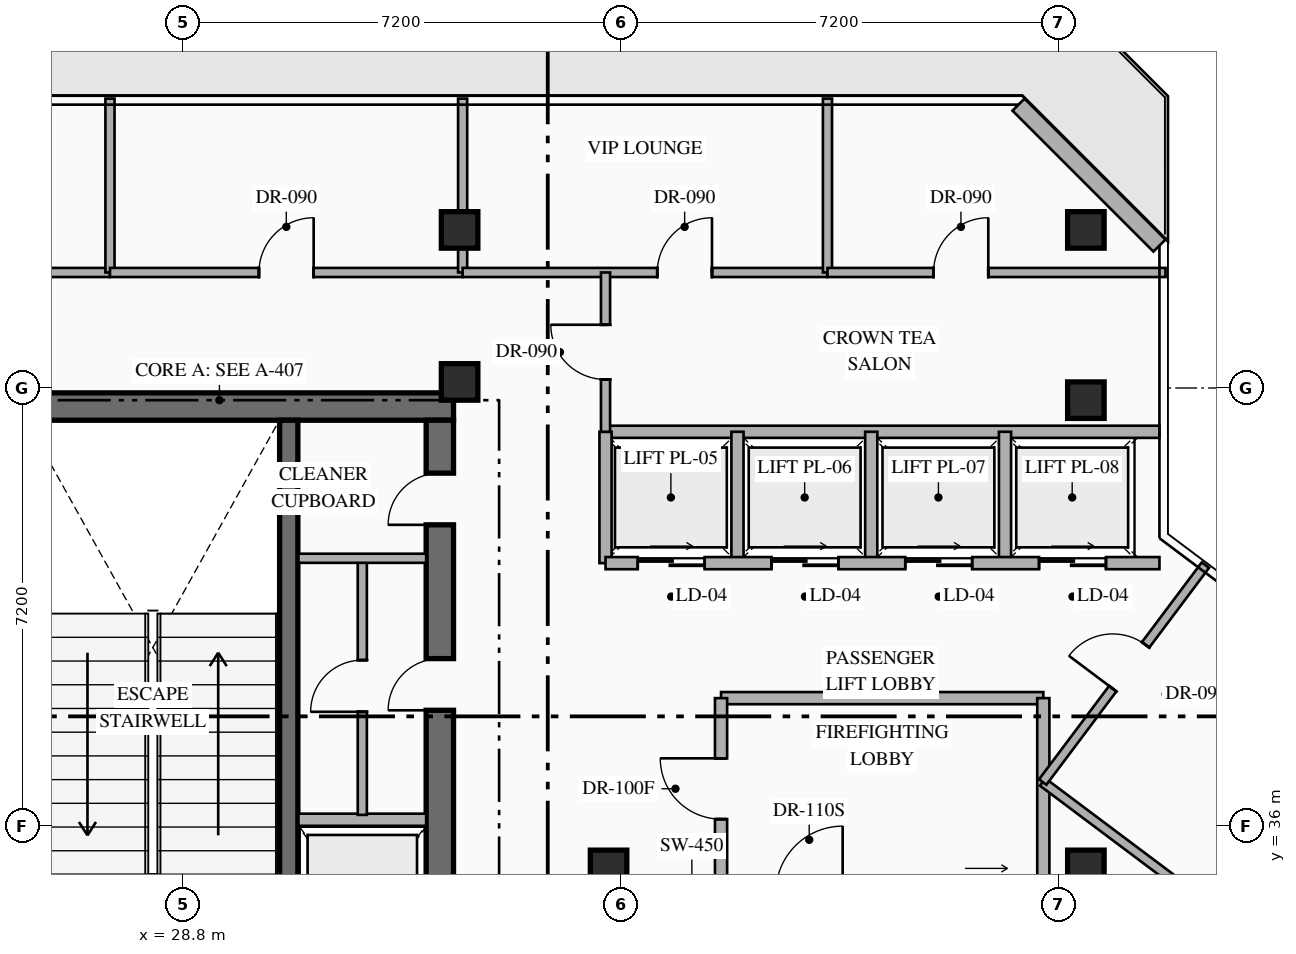
"""IFC4 building model, lengths in metres.
Left out: names, types, materials, properties, quantities, classifications, styles, units other than length and angle.
Written with IfcOpenShell. Run it as: python <this file> out.ifc"""

import sys

from ifc_helpers import new_model, si_unit, direction, frame, frame_2d, origin, origin_2d, place, context, subcontext, project, spatial, rectangle, hollow_rectangle, extrude, element, fill, save


model = new_model("IFC4")
c1 = context("Model", 3, precision=1e-05, world=origin(), true_north=direction((0.0, 1.0)))
c2 = subcontext(c1, "Body", "Model", "MODEL_VIEW")
j1 = project(units=[si_unit("LENGTHUNIT", "METRE"), si_unit("PLANEANGLEUNIT", "RADIAN")], contexts=[c1])
p1 = place(None, origin())
s1 = spatial("IfcSite", under=j1, at=p1, CompositionType="ELEMENT")
p2 = place(p1, origin())
s2 = spatial("IfcBuilding", under=s1, at=p2, CompositionType="ELEMENT")
p3 = place(p2, frame((0.0, 0.0, 265.95)))
s3 = spatial("IfcBuildingStorey", under=s2, at=p3, CompositionType="ELEMENT", Elevation=265.95)
p4 = place(p3, frame((25.77, 42.895, 0.0), z_axis=(0.0, 0.0, 1.0), x_axis=(1.0, 0.0, 0.0)))
e1 = element("IfcWall", 1, at=p4, inside=s3, PredefinedType="SHEAR", context=c2, shape_type="SweptSolid", body=[
    extrude(rectangle(XDim=7.48, YDim=0.45, at=frame_2d((3.74, 0.0))), origin(), (0.0, 0.0, 1.0), 4.0),
])
p5 = place(p3, frame((33.025, 33.19, 0.0), z_axis=(0.0, 0.0, 1.0), x_axis=(0.0, 1.0, 0.0)))
e2 = element("IfcWall", 2, at=p5, inside=s3, PredefinedType="SHEAR", context=c2, shape_type="SweptSolid", body=[
    extrude(rectangle(XDim=9.48, YDim=0.45, at=frame_2d((4.74, 0.0))), origin(), (0.0, 0.0, 1.0), 4.0),
])
p6 = place(p5, frame((4.71, 0.0, 0.0)))
e3 = element("IfcOpeningElement", 3, at=p6, cuts=e2, PredefinedType="OPENING", context=c2, shape_type="SweptSolid", body=[
    extrude(rectangle(XDim=0.85, YDim=2.08, at=frame_2d((0.425, 1.04))), frame((0.0, 0.235, 0.0), z_axis=(0.0, -1.0, 0.0), x_axis=(1.0, 0.0, 0.0)), (0.0, 0.0, 1.0), 0.47),
])
p7 = place(p5, frame((7.76, 0.0, 0.0)))
e4 = element("IfcOpeningElement", 4, at=p7, cuts=e2, PredefinedType="OPENING", context=c2, shape_type="SweptSolid", body=[
    extrude(rectangle(XDim=0.85, YDim=2.08, at=frame_2d((0.425, 1.04))), frame((0.0, 0.235, 0.0), z_axis=(0.0, -1.0, 0.0), x_axis=(1.0, 0.0, 0.0)), (0.0, 0.0, 1.0), 0.47),
])
p8 = place(p3, frame((30.54, 33.19, 0.0), z_axis=(0.0, 0.0, 1.0), x_axis=(0.0, 1.0, 0.0)))
e5 = element("IfcWall", 5, at=p8, inside=s3, PredefinedType="SHEAR", context=c2, shape_type="SweptSolid", body=[
    extrude(rectangle(XDim=9.48, YDim=0.3, at=frame_2d((4.74, 0.0))), origin(), (0.0, 0.0, 1.0), 4.0),
])
for number, where, z_axis, x_axis in (
    (6, (33.35, 43.3, 0.0), (0.0, 0.0, 1.0), (1.0, 0.0, 0.0)),
    (7, (35.8, 35.3, 0.0), (0.0, 0.0, 1.0), (1.0, 0.0, 0.0)),
    (8, (43.65, 35.3, 0.0), (0.0, 0.0, 1.0), (1.0, 0.0, 0.0)),
    (9, (43.65, 43.0, 0.0), (0.0, 0.0, 1.0), (1.0, 0.0, 0.0)),
    (10, (33.35, 45.8, 0.0), (0.0, 0.0, 1.0), (1.0, 0.0, 0.0)),
    (11, (43.65, 45.8, 0.0), (0.0, 0.0, 1.0), (1.0, 0.0, 0.0)),
):
    element("IfcColumn", number, at=place(p3, frame(where, z_axis=z_axis, x_axis=x_axis)), inside=s3, PredefinedType="COLUMN", context=c2, shape_type="SweptSolid", body=[
        extrude(hollow_rectangle(XDim=0.6, YDim=0.6, WallThickness=0.025, at=origin_2d()), origin(), (0.0, 0.0, 1.0), 4.0),
    ])
p9 = place(p3, frame((42.542, 47.86, 0.0), z_axis=(0.0, 0.0, 1.0), x_axis=(0.707106781187, -0.707106781187, 0.0)))
e12 = element("IfcWall", 12, at=p9, inside=s3, PredefinedType="STANDARD", context=c2, shape_type="SweptSolid", body=[
    extrude(rectangle(XDim=3.278, YDim=0.28, at=frame_2d((1.639, 0.0))), origin(), (0.0, 0.0, 1.0), 3.75),
])
p10 = place(p3, frame((30.7, 36.1, 0.0), z_axis=(0.0, 0.0, 1.0), x_axis=(1.0, 0.0, 0.0)))
e13 = element("IfcWall", 13, at=p10, inside=s3, PredefinedType="STANDARD", context=c2, shape_type="SweptSolid", body=[
    extrude(rectangle(XDim=2.1, YDim=0.2, at=frame_2d((1.05, 0.0))), origin(), (0.0, 0.0, 1.0), 3.75),
])
p11 = place(p3, frame((31.75, 36.18, 0.0), z_axis=(0.0, 0.0, 1.0), x_axis=(0.0, 1.0, 0.0)))
e14 = element("IfcWall", 14, at=p11, inside=s3, PredefinedType="PARTITIONING", context=c2, shape_type="SweptSolid", body=[
    extrude(rectangle(XDim=4.24, YDim=0.15, at=frame_2d((2.12, 0.0))), origin(), (0.0, 0.0, 1.0), 3.75),
])
p12 = place(p11, frame((1.695, 0.0, 0.0)))
e15 = element("IfcOpeningElement", 15, at=p12, cuts=e14, PredefinedType="OPENING", context=c2, shape_type="SweptSolid", body=[
    extrude(rectangle(XDim=0.85, YDim=2.08, at=frame_2d((0.425, 1.04))), frame((0.0, 0.085, 0.0), z_axis=(0.0, -1.0, 0.0), x_axis=(1.0, 0.0, 0.0)), (0.0, 0.0, 1.0), 0.17),
])
p13 = place(p3, frame((30.7, 40.4, 0.0), z_axis=(0.0, 0.0, 1.0), x_axis=(1.0, 0.0, 0.0)))
e16 = element("IfcWall", 16, at=p13, inside=s3, PredefinedType="PARTITIONING", context=c2, shape_type="SweptSolid", body=[
    extrude(rectangle(XDim=2.1, YDim=0.15, at=frame_2d((1.05, 0.0))), origin(), (0.0, 0.0, 1.0), 3.75),
])
p14 = place(p3, frame((37.65, 38.1, 0.0), z_axis=(0.0, 0.0, 1.0), x_axis=(1.0, 0.0, 0.0)))
e17 = element("IfcWall", 17, at=p14, inside=s3, PredefinedType="STANDARD", context=c2, shape_type="SweptSolid", body=[
    extrude(rectangle(XDim=5.3, YDim=0.2, at=frame_2d((2.65, 0.0))), origin(), (0.0, 0.0, 1.0), 3.75),
])
p15 = place(p3, frame((42.95, 35.12, 0.0), z_axis=(0.0, 0.0, 1.0), x_axis=(0.0, 1.0, 0.0)))
e18 = element("IfcWall", 18, at=p15, inside=s3, PredefinedType="STANDARD", context=c2, shape_type="SweptSolid", body=[
    extrude(rectangle(XDim=2.98, YDim=0.2, at=frame_2d((1.49, 0.0))), origin(), (0.0, 0.0, 1.0), 3.75),
])
p16 = place(p3, frame((37.65, 35.12, 0.0), z_axis=(0.0, 0.0, 1.0), x_axis=(0.0, 1.0, 0.0)))
e19 = element("IfcWall", 19, at=p16, inside=s3, PredefinedType="STANDARD", context=c2, shape_type="SweptSolid", body=[
    extrude(rectangle(XDim=2.98, YDim=0.2, at=frame_2d((1.49, 0.0))), origin(), (0.0, 0.0, 1.0), 3.75),
])
p17 = place(p16, frame((0.99, 0.0, 0.0)))
e20 = element("IfcOpeningElement", 20, at=p17, cuts=e19, PredefinedType="OPENING", context=c2, shape_type="SweptSolid", body=[
    extrude(rectangle(XDim=1.0, YDim=2.2, at=frame_2d((0.5, 1.1))), frame((0.0, 0.11, 0.0), z_axis=(0.0, -1.0, 0.0), x_axis=(1.0, 0.0, 0.0)), (0.0, 0.0, 1.0), 0.22),
])
p18 = place(p3, frame((35.75, 42.48, 0.0), z_axis=(0.0, 0.0, 1.0), x_axis=(1.0, 0.0, 0.0)))
e21 = element("IfcWall", 21, at=p18, inside=s3, PredefinedType="STANDARD", context=c2, shape_type="SweptSolid", body=[
    extrude(rectangle(XDim=9.11, YDim=0.2, at=frame_2d((4.555, 0.0))), origin(), (0.0, 0.0, 1.0), 3.75),
])
for number, where, z_axis, x_axis in (
    (22, (35.75, 40.32, 0.0), (0.0, 0.0, 1.0), (0.0, 1.0, 0.0)),
    (23, (37.92, 40.32, 0.0), (0.0, 0.0, 1.0), (0.0, 1.0, 0.0)),
    (24, (40.12, 40.32, 0.0), (0.0, 0.0, 1.0), (0.0, 1.0, 0.0)),
    (25, (42.32, 40.32, 0.0), (0.0, 0.0, 1.0), (0.0, 1.0, 0.0)),
):
    element("IfcWall", number, at=place(p3, frame(where, z_axis=z_axis, x_axis=x_axis)), inside=s3, PredefinedType="STANDARD", context=c2, shape_type="SweptSolid", body=[
        extrude(rectangle(XDim=2.16, YDim=0.2, at=frame_2d((1.08, 0.0))), origin(), (0.0, 0.0, 1.0), 3.75),
    ])
p19 = place(p3, frame((35.75, 40.32, 0.0), z_axis=(0.0, 0.0, 1.0), x_axis=(1.0, 0.0, 0.0)))
e26 = element("IfcWall", 26, at=p19, inside=s3, PredefinedType="STANDARD", context=c2, shape_type="SweptSolid", body=[
    extrude(rectangle(XDim=9.11, YDim=0.2, at=frame_2d((4.555, 0.0))), origin(), (0.0, 0.0, 1.0), 3.75),
])
p20 = place(p19, frame((0.53, 0.0, 0.0)))
e27 = element("IfcOpeningElement", 27, at=p20, cuts=e26, PredefinedType="OPENING", context=c2, shape_type="SweptSolid", body=[
    extrude(rectangle(XDim=1.1, YDim=2.18, at=frame_2d((0.55, 1.09))), frame((0.0, 0.11, 0.0), z_axis=(0.0, -1.0, 0.0), x_axis=(1.0, 0.0, 0.0)), (0.0, 0.0, 1.0), 0.22),
])
p21 = place(p19, frame((2.73, 0.0, 0.0)))
e28 = element("IfcOpeningElement", 28, at=p21, cuts=e26, PredefinedType="OPENING", context=c2, shape_type="SweptSolid", body=[
    extrude(rectangle(XDim=1.1, YDim=2.18, at=frame_2d((0.55, 1.09))), frame((0.0, 0.11, 0.0), z_axis=(0.0, -1.0, 0.0), x_axis=(1.0, 0.0, 0.0)), (0.0, 0.0, 1.0), 0.22),
])
p22 = place(p19, frame((4.93, 0.0, 0.0)))
e29 = element("IfcOpeningElement", 29, at=p22, cuts=e26, PredefinedType="OPENING", context=c2, shape_type="SweptSolid", body=[
    extrude(rectangle(XDim=1.1, YDim=2.18, at=frame_2d((0.55, 1.09))), frame((0.0, 0.11, 0.0), z_axis=(0.0, -1.0, 0.0), x_axis=(1.0, 0.0, 0.0)), (0.0, 0.0, 1.0), 0.22),
])
p23 = place(p19, frame((7.13, 0.0, 0.0)))
e30 = element("IfcOpeningElement", 30, at=p23, cuts=e26, PredefinedType="OPENING", context=c2, shape_type="SweptSolid", body=[
    extrude(rectangle(XDim=1.1, YDim=2.18, at=frame_2d((0.55, 1.09))), frame((0.0, 0.11, 0.0), z_axis=(0.0, -1.0, 0.0), x_axis=(1.0, 0.0, 0.0)), (0.0, 0.0, 1.0), 0.22),
])
p24 = place(p3, frame((22.15, 45.1, 0.0), z_axis=(0.0, 0.0, 1.0), x_axis=(1.0, 0.0, 0.0)))
e31 = element("IfcWall", 31, at=p24, inside=s3, PredefinedType="PARTITIONING", context=c2, shape_type="SweptSolid", body=[
    extrude(rectangle(XDim=5.45, YDim=0.15, at=frame_2d((2.725, 0.0))), origin(), (0.0, 0.0, 1.0), 3.75),
])
p25 = place(p24, frame((0.759, 0.0, 0.0)))
e32 = element("IfcOpeningElement", 32, at=p25, cuts=e31, PredefinedType="OPENING", context=c2, shape_type="SweptSolid", body=[
    extrude(rectangle(XDim=0.9, YDim=2.15, at=frame_2d((0.45, 1.075))), frame((0.0, 0.085, 0.0), z_axis=(0.0, -1.0, 0.0), x_axis=(1.0, 0.0, 0.0)), (0.0, 0.0, 1.0), 0.17),
])
p26 = place(p3, frame((27.6, 45.1, 0.0), z_axis=(0.0, 0.0, 1.0), x_axis=(0.0, 1.0, 0.0)))
e33 = element("IfcWall", 33, at=p26, inside=s3, PredefinedType="PARTITIONING", context=c2, shape_type="SweptSolid", body=[
    extrude(rectangle(XDim=2.86, YDim=0.15, at=frame_2d((1.43, 0.0))), origin(), (0.0, 0.0, 1.0), 3.75),
])
p27 = place(p3, frame((27.6, 45.1, 0.0), z_axis=(0.0, 0.0, 1.0), x_axis=(1.0, 0.0, 0.0)))
e34 = element("IfcWall", 34, at=p27, inside=s3, PredefinedType="PARTITIONING", context=c2, shape_type="SweptSolid", body=[
    extrude(rectangle(XDim=5.8, YDim=0.15, at=frame_2d((2.9, 0.0))), origin(), (0.0, 0.0, 1.0), 3.75),
])
p28 = place(p27, frame((2.45, 0.0, 0.0)))
e35 = element("IfcOpeningElement", 35, at=p28, cuts=e34, PredefinedType="OPENING", context=c2, shape_type="SweptSolid", body=[
    extrude(rectangle(XDim=0.9, YDim=2.15, at=frame_2d((0.45, 1.075))), frame((0.0, 0.085, 0.0), z_axis=(0.0, -1.0, 0.0), x_axis=(1.0, 0.0, 0.0)), (0.0, 0.0, 1.0), 0.17),
])
p29 = place(p3, frame((33.4, 45.1, 0.0), z_axis=(0.0, 0.0, 1.0), x_axis=(0.0, 1.0, 0.0)))
e36 = element("IfcWall", 36, at=p29, inside=s3, PredefinedType="PARTITIONING", context=c2, shape_type="SweptSolid", body=[
    extrude(rectangle(XDim=2.86, YDim=0.15, at=frame_2d((1.43, 0.0))), origin(), (0.0, 0.0, 1.0), 3.245),
])
p30 = place(p3, frame((33.4, 45.1, 0.0), z_axis=(0.0, 0.0, 1.0), x_axis=(1.0, 0.0, 0.0)))
e37 = element("IfcWall", 37, at=p30, inside=s3, PredefinedType="PARTITIONING", context=c2, shape_type="SweptSolid", body=[
    extrude(rectangle(XDim=6.0, YDim=0.15, at=frame_2d((3.0, 0.0))), origin(), (0.0, 0.0, 1.0), 3.75),
])
p31 = place(p30, frame((3.201, 0.0, 0.0)))
e38 = element("IfcOpeningElement", 38, at=p31, cuts=e37, PredefinedType="OPENING", context=c2, shape_type="SweptSolid", body=[
    extrude(rectangle(XDim=0.9, YDim=2.15, at=frame_2d((0.45, 1.075))), frame((0.0, 0.085, 0.0), z_axis=(0.0, -1.0, 0.0), x_axis=(1.0, 0.0, 0.0)), (0.0, 0.0, 1.0), 0.17),
])
p32 = place(p3, frame((39.4, 45.1, 0.0), z_axis=(0.0, 0.0, 1.0), x_axis=(0.0, 1.0, 0.0)))
e39 = element("IfcWall", 39, at=p32, inside=s3, PredefinedType="PARTITIONING", context=c2, shape_type="SweptSolid", body=[
    extrude(rectangle(XDim=2.86, YDim=0.15, at=frame_2d((1.43, 0.0))), origin(), (0.0, 0.0, 1.0), 3.75),
])
p33 = place(p3, frame((39.4, 45.1, 0.0), z_axis=(0.0, 0.0, 1.0), x_axis=(1.0, 0.0, 0.0)))
e40 = element("IfcWall", 40, at=p33, inside=s3, PredefinedType="PARTITIONING", context=c2, shape_type="SweptSolid", body=[
    extrude(rectangle(XDim=5.56, YDim=0.15, at=frame_2d((2.78, 0.0))), origin(), (0.0, 0.0, 1.0), 3.75),
])
p34 = place(p33, frame((1.745, 0.0, 0.0)))
e41 = element("IfcOpeningElement", 41, at=p34, cuts=e40, PredefinedType="OPENING", context=c2, shape_type="SweptSolid", body=[
    extrude(rectangle(XDim=0.9, YDim=2.15, at=frame_2d((0.45, 1.075))), frame((0.0, 0.085, 0.0), z_axis=(0.0, -1.0, 0.0), x_axis=(1.0, 0.0, 0.0)), (0.0, 0.0, 1.0), 0.17),
])
p35 = place(p3, frame((35.75, 42.48, 0.0), z_axis=(0.0, 0.0, 1.0), x_axis=(0.0, 1.0, 0.0)))
e42 = element("IfcWall", 42, at=p35, inside=s3, PredefinedType="PARTITIONING", context=c2, shape_type="SweptSolid", body=[
    extrude(rectangle(XDim=2.62, YDim=0.15, at=frame_2d((1.31, 0.0))), origin(), (0.0, 0.0, 1.0), 3.75),
])
p36 = place(p35, frame((0.86, 0.0, 0.0)))
e43 = element("IfcOpeningElement", 43, at=p36, cuts=e42, PredefinedType="OPENING", context=c2, shape_type="SweptSolid", body=[
    extrude(rectangle(XDim=0.9, YDim=2.15, at=frame_2d((0.45, 1.075))), frame((0.0, 0.085, 0.0), z_axis=(0.0, -1.0, 0.0), x_axis=(1.0, 0.0, 0.0)), (0.0, 0.0, 1.0), 0.17),
])
p37 = place(p3, frame((42.94, 36.72, 0.0), z_axis=(0.0, 0.0, 1.0), x_axis=(0.800013316712, -0.599982243973, 0.0)))
e44 = element("IfcWall", 44, at=p37, inside=s3, PredefinedType="PARTITIONING", context=c2, shape_type="SweptSolid", body=[
    extrude(rectangle(XDim=4.4, YDim=0.15, at=frame_2d((2.2, 0.0))), origin(), (0.0, 0.0, 1.0), 3.295),
])
p38 = place(p3, frame((42.94, 36.72, 0.0), z_axis=(0.0, 0.0, 1.0), x_axis=(0.599991241767, 0.8000065686, 0.0)))
e45 = element("IfcWall", 45, at=p38, inside=s3, PredefinedType="PARTITIONING", context=c2, shape_type="SweptSolid", body=[
    extrude(rectangle(XDim=4.46, YDim=0.15, at=frame_2d((2.23, 0.0))), origin(), (0.0, 0.0, 1.0), 3.75),
])
p39 = place(p38, frame((1.92, 0.0, 0.0)))
e46 = element("IfcOpeningElement", 46, at=p39, cuts=e45, PredefinedType="OPENING", context=c2, shape_type="SweptSolid", body=[
    extrude(rectangle(XDim=0.9, YDim=2.15, at=frame_2d((0.45, 1.075))), frame((0.0, 0.085, 0.0), z_axis=(0.0, -1.0, 0.0), x_axis=(1.0, 0.0, 0.0)), (0.0, 0.0, 1.0), 0.17),
])
p40 = place(p6, origin())
e47 = element("IfcDoor", 47, at=p40, inside=s3, OperationType="SINGLE_SWING_LEFT", PredefinedType="DOOR", context=c2, shape_type="SweptSolid", body=[
    extrude(rectangle(XDim=0.85, YDim=2.08, at=frame_2d((0.425, 1.04))), frame((0.0, 0.025, 0.0), z_axis=(0.0, -1.0, 0.0), x_axis=(1.0, 0.0, 0.0)), (0.0, 0.0, 1.0), 0.05),
])
fill(e3, e47)
p41 = place(p7, origin())
e48 = element("IfcDoor", 48, at=p41, inside=s3, OperationType="SINGLE_SWING_LEFT", PredefinedType="DOOR", context=c2, shape_type="SweptSolid", body=[
    extrude(rectangle(XDim=0.85, YDim=2.08, at=frame_2d((0.425, 1.04))), frame((0.0, 0.025, 0.0), z_axis=(0.0, -1.0, 0.0), x_axis=(1.0, 0.0, 0.0)), (0.0, 0.0, 1.0), 0.05),
])
fill(e4, e48)
p42 = place(p12, origin())
e49 = element("IfcDoor", 49, at=p42, inside=s3, OperationType="SINGLE_SWING_LEFT", PredefinedType="DOOR", context=c2, shape_type="SweptSolid", body=[
    extrude(rectangle(XDim=0.85, YDim=2.08, at=frame_2d((0.425, 1.04))), frame((0.0, 0.025, 0.0), z_axis=(0.0, -1.0, 0.0), x_axis=(1.0, 0.0, 0.0)), (0.0, 0.0, 1.0), 0.05),
])
fill(e15, e49)
p43 = place(p17, origin())
e50 = element("IfcDoor", 50, at=p43, inside=s3, OperationType="SINGLE_SWING_RIGHT", PredefinedType="DOOR", context=c2, shape_type="SweptSolid", body=[
    extrude(rectangle(XDim=1.0, YDim=2.2, at=frame_2d((0.5, 1.1))), frame((0.0, 0.025, 0.0), z_axis=(0.0, -1.0, 0.0), x_axis=(1.0, 0.0, 0.0)), (0.0, 0.0, 1.0), 0.05),
])
fill(e20, e50)
p44 = place(p20, origin())
e51 = element("IfcDoor", 51, at=p44, inside=s3, OperationType="SLIDING_TO_RIGHT", PredefinedType="USERDEFINED", context=c2, shape_type="SweptSolid", body=[
    extrude(rectangle(XDim=1.1, YDim=2.18, at=frame_2d((0.55, 1.09))), frame((0.0, 0.025, 0.0), z_axis=(0.0, -1.0, 0.0), x_axis=(1.0, 0.0, 0.0)), (0.0, 0.0, 1.0), 0.05),
])
fill(e27, e51)
p45 = place(p21, origin())
e52 = element("IfcDoor", 52, at=p45, inside=s3, OperationType="SLIDING_TO_RIGHT", PredefinedType="USERDEFINED", context=c2, shape_type="SweptSolid", body=[
    extrude(rectangle(XDim=1.1, YDim=2.18, at=frame_2d((0.55, 1.09))), frame((0.0, 0.025, 0.0), z_axis=(0.0, -1.0, 0.0), x_axis=(1.0, 0.0, 0.0)), (0.0, 0.0, 1.0), 0.05),
])
fill(e28, e52)
p46 = place(p22, origin())
e53 = element("IfcDoor", 53, at=p46, inside=s3, OperationType="SLIDING_TO_RIGHT", PredefinedType="USERDEFINED", context=c2, shape_type="SweptSolid", body=[
    extrude(rectangle(XDim=1.1, YDim=2.18, at=frame_2d((0.55, 1.09))), frame((0.0, 0.025, 0.0), z_axis=(0.0, -1.0, 0.0), x_axis=(1.0, 0.0, 0.0)), (0.0, 0.0, 1.0), 0.05),
])
fill(e29, e53)
p47 = place(p23, origin())
e54 = element("IfcDoor", 54, at=p47, inside=s3, OperationType="SLIDING_TO_RIGHT", PredefinedType="USERDEFINED", context=c2, shape_type="SweptSolid", body=[
    extrude(rectangle(XDim=1.1, YDim=2.18, at=frame_2d((0.55, 1.09))), frame((0.0, 0.025, 0.0), z_axis=(0.0, -1.0, 0.0), x_axis=(1.0, 0.0, 0.0)), (0.0, 0.0, 1.0), 0.05),
])
fill(e30, e54)
p48 = place(p28, origin())
e55 = element("IfcDoor", 55, at=p48, inside=s3, OperationType="SINGLE_SWING_RIGHT", PredefinedType="DOOR", context=c2, shape_type="SweptSolid", body=[
    extrude(rectangle(XDim=0.9, YDim=2.15, at=frame_2d((0.45, 1.075))), frame((0.0, 0.025, 0.0), z_axis=(0.0, -1.0, 0.0), x_axis=(1.0, 0.0, 0.0)), (0.0, 0.0, 1.0), 0.05),
])
fill(e35, e55)
p49 = place(p31, origin())
e56 = element("IfcDoor", 56, at=p49, inside=s3, OperationType="SINGLE_SWING_RIGHT", PredefinedType="DOOR", context=c2, shape_type="SweptSolid", body=[
    extrude(rectangle(XDim=0.9, YDim=2.15, at=frame_2d((0.45, 1.075))), frame((0.0, 0.025, 0.0), z_axis=(0.0, -1.0, 0.0), x_axis=(1.0, 0.0, 0.0)), (0.0, 0.0, 1.0), 0.05),
])
fill(e38, e56)
p50 = place(p34, origin())
e57 = element("IfcDoor", 57, at=p50, inside=s3, OperationType="SINGLE_SWING_RIGHT", PredefinedType="DOOR", context=c2, shape_type="SweptSolid", body=[
    extrude(rectangle(XDim=0.9, YDim=2.15, at=frame_2d((0.45, 1.075))), frame((0.0, 0.025, 0.0), z_axis=(0.0, -1.0, 0.0), x_axis=(1.0, 0.0, 0.0)), (0.0, 0.0, 1.0), 0.05),
])
fill(e41, e57)
p51 = place(p36, origin())
e58 = element("IfcDoor", 58, at=p51, inside=s3, OperationType="SINGLE_SWING_RIGHT", PredefinedType="DOOR", context=c2, shape_type="SweptSolid", body=[
    extrude(rectangle(XDim=0.9, YDim=2.15, at=frame_2d((0.45, 1.075))), frame((0.0, 0.025, 0.0), z_axis=(0.0, -1.0, 0.0), x_axis=(1.0, 0.0, 0.0)), (0.0, 0.0, 1.0), 0.05),
])
fill(e43, e58)
p52 = place(p39, origin())
e59 = element("IfcDoor", 59, at=p52, inside=s3, OperationType="SINGLE_SWING_LEFT", PredefinedType="DOOR", context=c2, shape_type="SweptSolid", body=[
    extrude(rectangle(XDim=0.9, YDim=2.15, at=frame_2d((0.45, 1.075))), frame((0.0, 0.025, 0.0), z_axis=(0.0, -1.0, 0.0), x_axis=(1.0, 0.0, 0.0)), (0.0, 0.0, 1.0), 0.05),
])
fill(e46, e59)
save(model, sys.argv[1])
